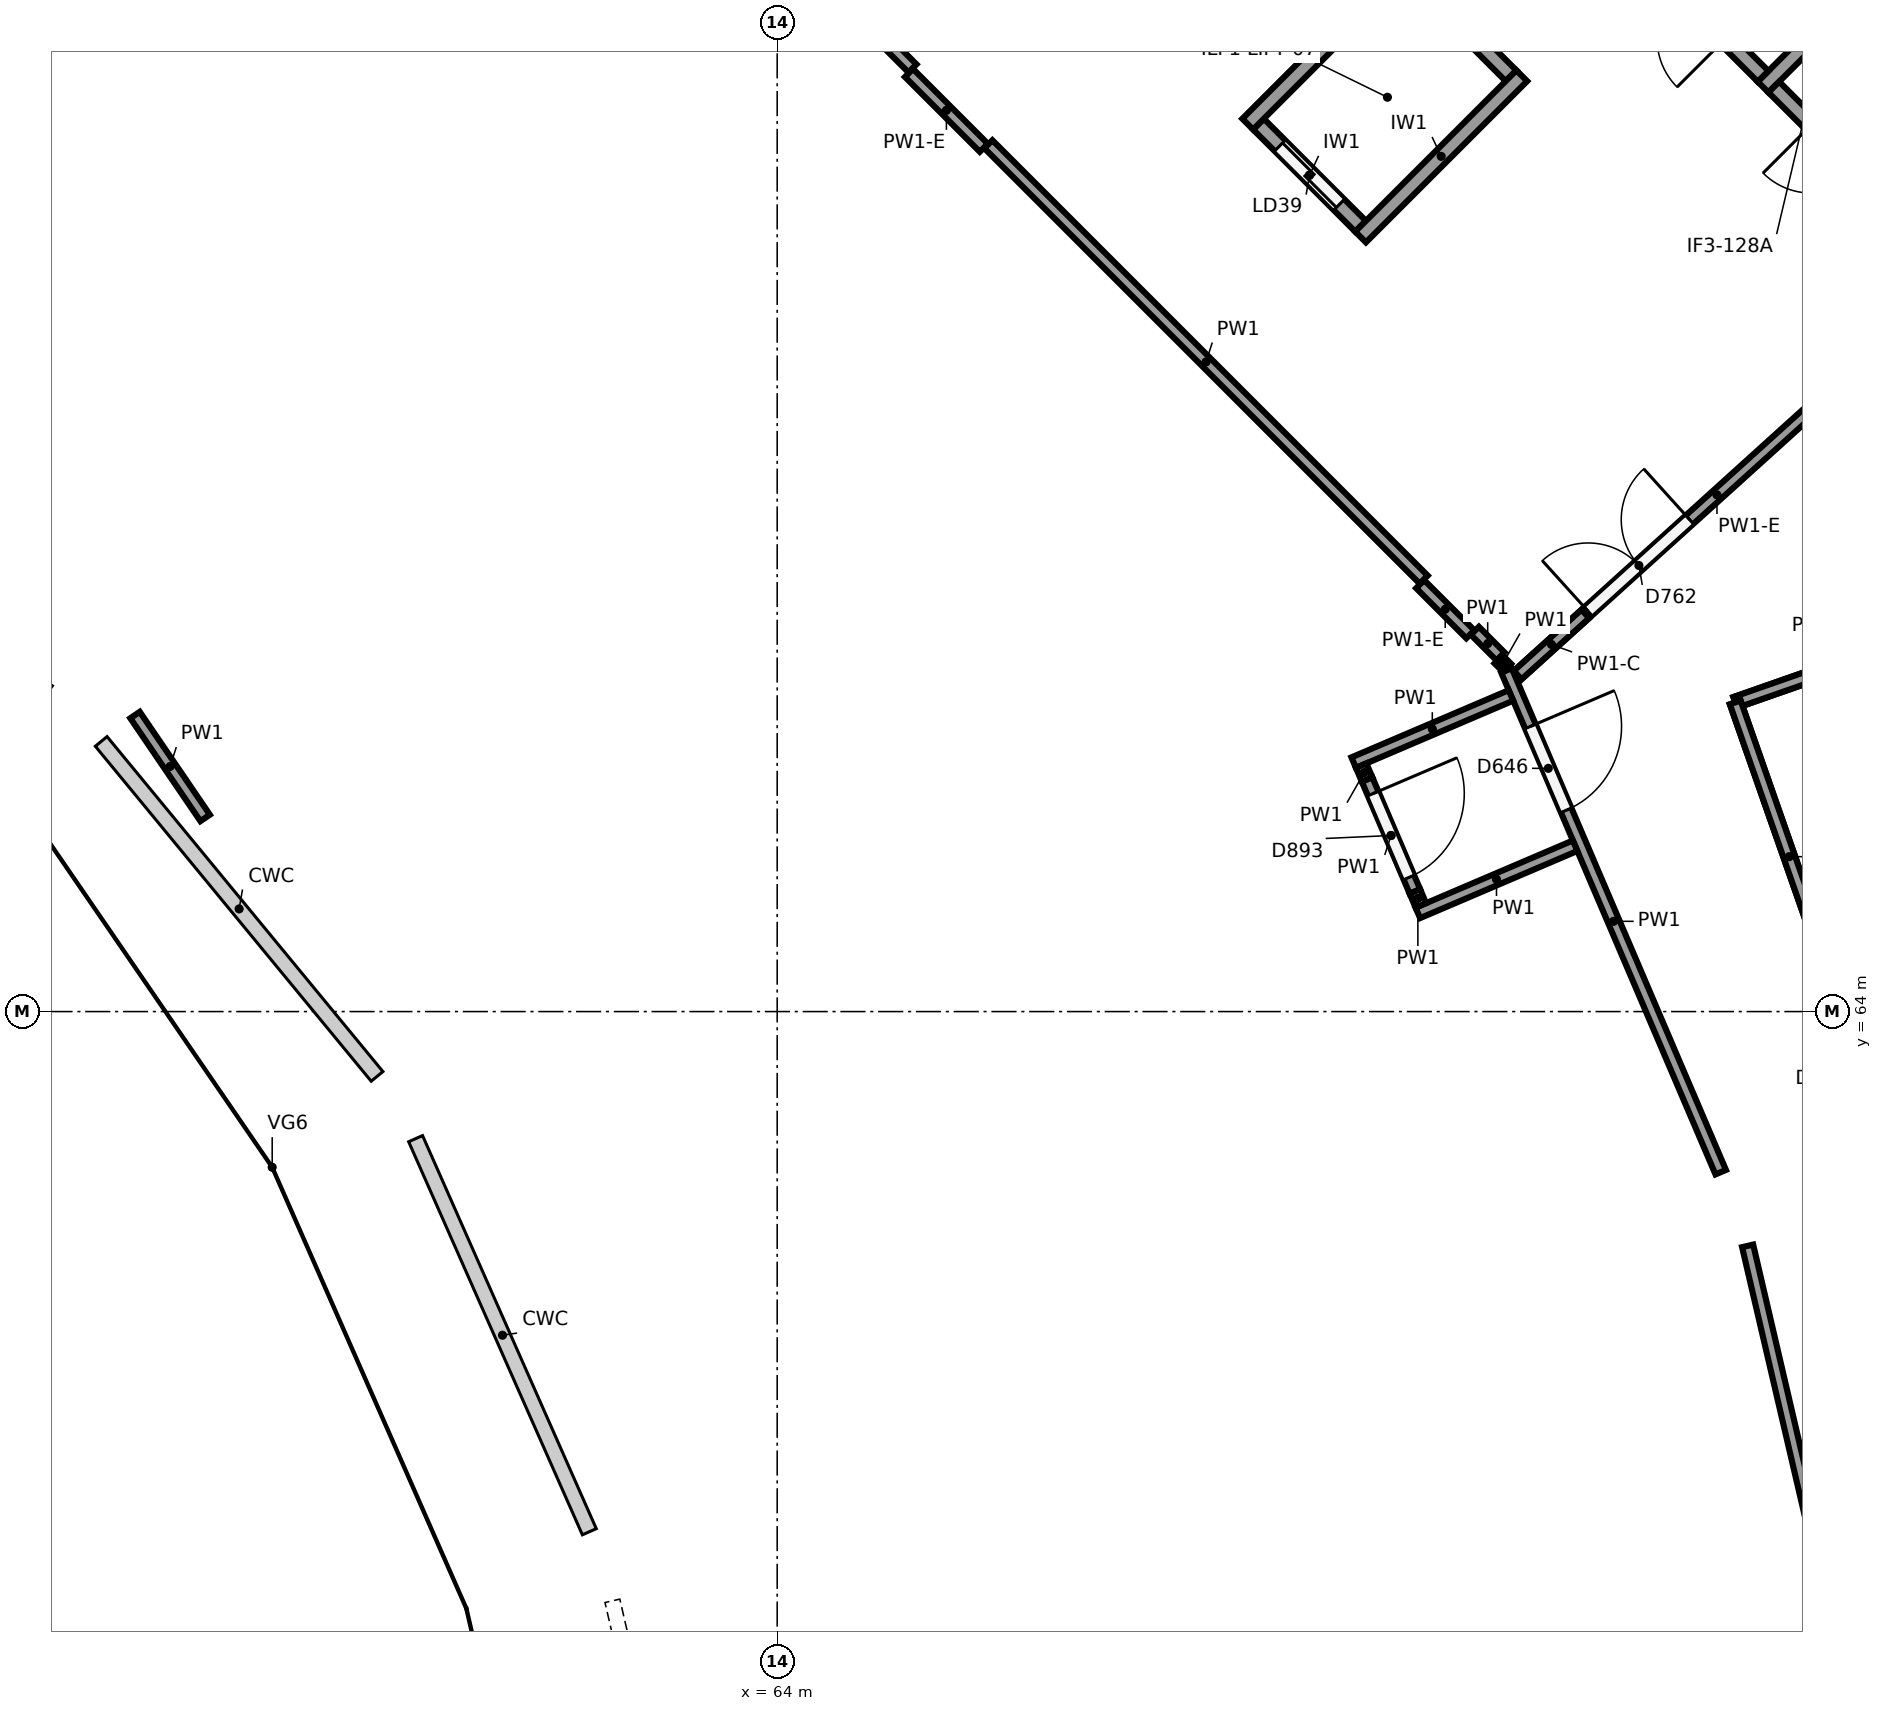
"""IFC4 building model, lengths in metres.
Left out: names, types, materials, properties, quantities, classifications, styles, units other than length and angle.
Written with IfcOpenShell. Run it as: python <this file> out.ifc"""

import sys

from ifc_helpers import new_model, si_unit, direction, frame, frame_2d, origin, origin_2d, place, context, subcontext, project, spatial, rectangle, circle, extrude, element, fill, save


model = new_model("IFC4")
c1 = context("Model", 3, precision=1e-05, world=origin(), true_north=direction((0.0, 1.0)))
c2 = subcontext(c1, "Body", "Model", "MODEL_VIEW")
j1 = project(units=[si_unit("LENGTHUNIT", "METRE"), si_unit("PLANEANGLEUNIT", "RADIAN")], contexts=[c1])
p1 = place(None, origin())
s1 = spatial("IfcSite", under=j1, at=p1, CompositionType="ELEMENT")
p2 = place(p1, origin())
s2 = spatial("IfcBuilding", under=s1, at=p2, CompositionType="ELEMENT")
p3 = place(p2, frame((0.0, 0.0, 6.5)))
s3 = spatial("IfcBuildingStorey", under=s2, at=p3, CompositionType="ELEMENT", Elevation=6.5)
p4 = place(p3, frame((61.723, 56.716, 0.0), z_axis=(0.0, 0.0, 1.0), x_axis=(1.0, 0.0, 0.0)))
e1 = element("IfcColumn", 1, at=p4, inside=s3, PredefinedType="COLUMN", context=c2, shape_type="SweptSolid", body=[
    extrude(circle(Radius=0.45, at=origin_2d()), origin(), (0.0, 0.0, 1.0), 5.5),
])
p5 = place(p3, frame((62.964, 57.104, 0.0), z_axis=(0.0, 0.0, 1.0), x_axis=(1.0, 0.0, 0.0)))
e2 = element("IfcColumn", 2, at=p5, inside=s3, PredefinedType="COLUMN", context=c2, shape_type="SweptSolid", body=[
    extrude(circle(Radius=0.4, at=origin_2d()), origin(), (0.0, 0.0, 1.0), 5.5),
])
p6 = place(p3, frame((71.17, 59.677, 0.0), z_axis=(0.0, 0.0, 1.0), x_axis=(1.0, 0.0, 0.0)))
e3 = element("IfcColumn", 3, at=p6, inside=s3, PredefinedType="COLUMN", context=c2, shape_type="SweptSolid", body=[
    extrude(circle(Radius=0.45, at=origin_2d()), origin(), (0.0, 0.0, 1.0), 5.5),
])
p7 = place(p3, frame((54.364, 60.513, 0.0), z_axis=(0.0, 0.0, 1.0), x_axis=(1.0, 0.0, 0.0)))
e4 = element("IfcColumn", 4, at=p7, inside=s3, PredefinedType="COLUMN", context=c2, shape_type="SweptSolid", body=[
    extrude(circle(Radius=0.45, at=origin_2d()), origin(), (0.0, 0.0, 1.0), 5.392),
])
p8 = place(p3, frame((59.049, 62.766, 0.0), z_axis=(0.0, 0.0, 1.0), x_axis=(1.0, 0.0, 0.0)))
e5 = element("IfcColumn", 5, at=p8, inside=s3, PredefinedType="COLUMN", context=c2, shape_type="SweptSolid", body=[
    extrude(circle(Radius=0.45, at=origin_2d()), origin(), (0.0, 0.0, 1.0), 5.5),
])
p9 = place(p3, frame((60.222, 63.331, 0.0), z_axis=(0.0, 0.0, 1.0), x_axis=(1.0, 0.0, 0.0)))
e6 = element("IfcColumn", 6, at=p9, inside=s3, PredefinedType="COLUMN", context=c2, shape_type="SweptSolid", body=[
    extrude(circle(Radius=0.4, at=origin_2d()), origin(), (0.0, 0.0, 1.0), 5.5),
])
for number, where, z_axis, x_axis in (
    (7, (67.972, 67.058, 0.0), (0.0, 0.0, 1.0), (1.0, 0.0, 0.0)),
    (8, (54.82, 67.902, 0.0), (0.0, 0.0, 1.0), (1.0, 0.0, 0.0)),
):
    element("IfcColumn", number, at=place(p3, frame(where, z_axis=z_axis, x_axis=x_axis)), inside=s3, PredefinedType="COLUMN", context=c2, shape_type="SweptSolid", body=[
        extrude(circle(Radius=0.45, at=origin_2d()), origin(), (0.0, 0.0, 1.0), 5.5),
    ])
p10 = place(p3, frame((55.94, 68.658, 0.0), z_axis=(0.0, 0.0, 1.0), x_axis=(1.0, 0.0, 0.0)))
e9 = element("IfcColumn", 9, at=p10, inside=s3, PredefinedType="COLUMN", context=c2, shape_type="SweptSolid", body=[
    extrude(circle(Radius=0.4, at=origin_2d()), origin(), (0.0, 0.0, 1.0), 5.5),
])
p11 = place(p3, frame((63.068, 73.47, 0.0), z_axis=(0.0, 0.0, 1.0), x_axis=(1.0, 0.0, 0.0)))
e10 = element("IfcColumn", 10, at=p11, inside=s3, PredefinedType="COLUMN", context=c2, shape_type="SweptSolid", body=[
    extrude(circle(Radius=0.45, at=origin_2d()), origin(), (0.0, 0.0, 1.0), 5.5),
])
p12 = place(p3, frame((78.173, 77.365, 0.0), z_axis=(0.0, 0.0, 1.0), x_axis=(-0.707178586901, -0.707034968179, 0.0)))
e11 = element("IfcWall", 11, at=p12, inside=s3, PredefinedType="SHEAR", context=c2, shape_type="SweptSolid", body=[
    extrude(rectangle(XDim=1.7, YDim=0.2, at=frame_2d((0.85, 0.0))), origin(), (0.0, 0.0, 1.0), 5.15),
])
p13 = place(p3, frame((79.375, 73.9, 0.0), z_axis=(0.0, 0.0, 1.0), x_axis=(-0.707068634461, 0.707144925854, 0.0)))
e12 = element("IfcWall", 12, at=p13, inside=s3, PredefinedType="SHEAR", context=c2, shape_type="SweptSolid", body=[
    extrude(rectangle(XDim=3.2, YDim=0.2, at=frame_2d((1.6, 0.0))), origin(), (0.0, 0.0, 1.0), 5.15),
])
p14 = place(p13, frame((0.7, 0.0, 0.0)))
e13 = element("IfcOpeningElement", 13, at=p14, cuts=e12, PredefinedType="OPENING", context=c2, shape_type="SweptSolid", body=[
    extrude(rectangle(XDim=1.8, YDim=2.1, at=frame_2d((0.9, 1.05))), frame((0.0, 0.11, 0.0), z_axis=(0.0, -1.0, 0.0), x_axis=(1.0, 0.0, 0.0)), (0.0, 0.0, 1.0), 0.22),
])
p15 = place(p3, frame((76.971, 76.304, 0.0), z_axis=(0.0, 0.0, 1.0), x_axis=(-0.707106781187, 0.707106781187, 0.0)))
e14 = element("IfcWall", 14, at=p15, inside=s3, PredefinedType="SHEAR", context=c2, shape_type="SweptSolid", body=[
    extrude(rectangle(XDim=3.2, YDim=0.2, at=frame_2d((1.6, 0.0))), origin(), (0.0, 0.0, 1.0), 5.15),
])
p16 = place(p15, frame((0.7, 0.0, 0.0)))
e15 = element("IfcOpeningElement", 15, at=p16, cuts=e14, PredefinedType="OPENING", context=c2, shape_type="SweptSolid", body=[
    extrude(rectangle(XDim=1.8, YDim=2.1, at=frame_2d((0.9, 1.05))), frame((0.0, 0.11, 0.0), z_axis=(0.0, -1.0, 0.0), x_axis=(1.0, 0.0, 0.0)), (0.0, 0.0, 1.0), 0.22),
])
for number, where, z_axis, x_axis in (
    (16, (73.797, 76.312, 0.0), (0.0, 0.0, 1.0), (-0.707, -0.707, 0.0)),
    (17, (72.312, 77.797, 0.0), (0.0, 0.0, 1.0), (-0.707, -0.707, 0.0)),
):
    element("IfcWall", number, at=place(p3, frame(where, z_axis=z_axis, x_axis=x_axis)), inside=s3, PredefinedType="SHEAR", context=c2, shape_type="SweptSolid", body=[
        extrude(rectangle(XDim=3.0, YDim=0.2, at=frame_2d((1.5, 0.0))), origin(), (0.0, 0.0, 1.0), 5.15),
    ])
p17 = place(p3, frame((73.656, 76.312, 0.0), z_axis=(0.0, 0.0, 1.0), x_axis=(-0.707106781187, 0.707106781187, 0.0)))
e18 = element("IfcWall", 18, at=p17, inside=s3, PredefinedType="SHEAR", context=c2, shape_type="SweptSolid", body=[
    extrude(rectangle(XDim=1.9, YDim=0.2, at=frame_2d((0.95, 0.0))), origin(), (0.0, 0.0, 1.0), 5.15),
])
p18 = place(p3, frame((71.676, 74.332, 0.0), z_axis=(0.0, 0.0, 1.0), x_axis=(-0.707106781187, 0.707106781187, 0.0)))
e19 = element("IfcWall", 19, at=p18, inside=s3, PredefinedType="SHEAR", context=c2, shape_type="SweptSolid", body=[
    extrude(rectangle(XDim=1.9, YDim=0.2, at=frame_2d((0.95, 0.0))), origin(), (0.0, 0.0, 1.0), 5.15),
])
p19 = place(p18, frame((0.4, 0.0, 0.0)))
e20 = element("IfcOpeningElement", 20, at=p19, cuts=e19, PredefinedType="OPENING", context=c2, shape_type="SweptSolid", body=[
    extrude(rectangle(XDim=1.1, YDim=2.1, at=frame_2d((0.55, 1.05))), frame((0.0, 0.11, 0.0), z_axis=(0.0, -1.0, 0.0), x_axis=(1.0, 0.0, 0.0)), (0.0, 0.0, 1.0), 0.22),
])
p20 = place(p3, frame((76.768, 60.918, 0.0), z_axis=(0.0, 0.0, 1.0), x_axis=(0.226944673482, -0.973907652284, 0.0)))
e21 = element("IfcWall", 21, at=p20, inside=s3, PredefinedType="PARTITIONING", context=c2, shape_type="SweptSolid", body=[
    extrude(rectangle(XDim=7.882, YDim=0.15, at=frame_2d((3.941, 0.0))), origin(), (0.0, 0.0, 1.0), 5.15),
])
p21 = place(p3, frame((56.473, 66.547, 0.0), z_axis=(0.0, 0.0, 1.0), x_axis=(-0.562994599626, 0.826460574252, 0.0)))
e22 = element("IfcWall", 22, at=p21, inside=s3, PredefinedType="PARTITIONING", context=c2, shape_type="SweptSolid", body=[
    extrude(rectangle(XDim=1.638, YDim=0.15, at=frame_2d((0.819, 0.0))), origin(), (0.0, 0.0, 1.0), 5.15),
])
p22 = place(p3, frame((66.779, 75.41, 0.0), z_axis=(0.0, 0.0, 1.0), x_axis=(0.707091708943, -0.707121853109, 0.0)))
e23 = element("IfcWall", 23, at=p22, inside=s3, PredefinedType="PARTITIONING", context=c2, shape_type="SweptSolid", body=[
    extrude(rectangle(XDim=8.099, YDim=0.15, at=frame_2d((4.05, 0.0))), origin(), (0.0, 0.0, 1.0), 5.15),
])
p23 = place(p3, frame((73.179, 69.01, 0.0), z_axis=(0.0, 0.0, 1.0), x_axis=(0.707106781187, -0.707106781187, 0.0)))
e24 = element("IfcWall", 24, at=p23, inside=s3, PredefinedType="PARTITIONING", context=c2, shape_type="SweptSolid", body=[
    extrude(rectangle(XDim=0.477, YDim=0.15, at=frame_2d((0.238, 0.0))), origin(), (0.0, 0.0, 1.0), 5.15),
])
p24 = place(p3, frame((73.595, 68.488, 0.0), z_axis=(0.0, 0.0, 1.0), x_axis=(0.392716080943, -0.919659763047, 0.0)))
e25 = element("IfcWall", 25, at=p24, inside=s3, PredefinedType="PARTITIONING", context=c2, shape_type="SweptSolid", body=[
    extrude(rectangle(XDim=7.177, YDim=0.15, at=frame_2d((3.589, 0.0))), origin(), (0.0, 0.0, 1.0), 5.15),
])
p25 = place(p24, frame((0.8, 0.0, 0.0)))
e26 = element("IfcOpeningElement", 26, at=p25, cuts=e25, PredefinedType="OPENING", context=c2, shape_type="SweptSolid", body=[
    extrude(rectangle(XDim=1.2, YDim=2.1, at=frame_2d((0.6, 1.05))), frame((0.0, 0.085, 0.0), z_axis=(0.0, -1.0, 0.0), x_axis=(1.0, 0.0, 0.0)), (0.0, 0.0, 1.0), 0.17),
])
p26 = place(p3, frame((64.216, 77.973, 0.0), z_axis=(0.0, 0.0, 1.0), x_axis=(0.707161957089, -0.707051600978, 0.0)))
e27 = element("IfcWall", 27, at=p26, inside=s3, PredefinedType="PARTITIONING", context=c2, shape_type="SweptSolid", body=[
    extrude(rectangle(XDim=2.212, YDim=0.15, at=frame_2d((1.106, 0.0))), origin(), (0.0, 0.0, 1.0), 5.15),
])
p27 = place(p3, frame((82.677, 70.192, 0.0), z_axis=(0.0, 0.0, 1.0), x_axis=(-0.943884385731, -0.330276045715, 0.0)))
e28 = element("IfcWall", 28, at=p27, inside=s3, PredefinedType="PARTITIONING", context=c2, shape_type="SweptSolid", body=[
    extrude(rectangle(XDim=6.433, YDim=0.15, at=frame_2d((3.217, 0.0))), origin(), (0.0, 0.0, 1.0), 4.25),
])
p28 = place(p27, frame((0.75, 0.0, 0.0)))
e29 = element("IfcOpeningElement", 29, at=p28, cuts=e28, PredefinedType="OPENING", context=c2, shape_type="SweptSolid", body=[
    extrude(rectangle(XDim=1.8, YDim=2.1, at=frame_2d((0.9, 1.05))), frame((0.0, 0.085, 0.0), z_axis=(0.0, -1.0, 0.0), x_axis=(1.0, 0.0, 0.0)), (0.0, 0.0, 1.0), 0.17),
])
p29 = place(p3, frame((78.941, 68.884, 4.25), z_axis=(0.0, 0.0, 1.0), x_axis=(-0.943892194222, -0.330253729256, 0.0)))
e30 = element("IfcWall", 30, at=p29, inside=s3, PredefinedType="PARTITIONING", context=c2, shape_type="SweptSolid", body=[
    extrude(rectangle(XDim=2.474, YDim=0.15, at=frame_2d((1.237, 0.0))), origin(), (0.0, 0.0, 1.0), 0.9),
])
p30 = place(p3, frame((76.605, 68.067, 0.0), z_axis=(0.0, 0.0, 1.0), x_axis=(0.330282309563, -0.943882193915, 0.0)))
e31 = element("IfcWall", 31, at=p30, inside=s3, PredefinedType="PARTITIONING", context=c2, shape_type="SweptSolid", body=[
    extrude(rectangle(XDim=13.89, YDim=0.15, at=frame_2d((6.945, 0.0))), origin(), (0.0, 0.0, 1.0), 4.05),
])
p31 = place(p30, frame((4.35, 0.0, 0.0)))
e32 = element("IfcOpeningElement", 32, at=p31, cuts=e31, PredefinedType="OPENING", context=c2, shape_type="SweptSolid", body=[
    extrude(rectangle(XDim=1.8, YDim=2.1, at=frame_2d((0.9, 1.05))), frame((0.0, 0.085, 0.0), z_axis=(0.0, -1.0, 0.0), x_axis=(1.0, 0.0, 0.0)), (0.0, 0.0, 1.0), 0.17),
])
p32 = place(p3, frame((76.605, 68.067, 4.05), z_axis=(0.0, 0.0, 1.0), x_axis=(0.330261909448, -0.943889332055, 0.0)))
e33 = element("IfcWall", 33, at=p32, inside=s3, PredefinedType="PARTITIONING", context=c2, shape_type="SweptSolid", body=[
    extrude(rectangle(XDim=4.3, YDim=0.15, at=frame_2d((2.15, 0.0))), origin(), (0.0, 0.0, 1.0), 1.1),
])
p33 = place(p3, frame((65.734, 76.349, 0.0), z_axis=(0.0, 0.0, 1.0), x_axis=(0.707106781187, -0.707106781187, 0.0)))
e34 = element("IfcWall", 34, at=p33, inside=s3, PredefinedType="PARTITIONING", context=c2, shape_type="SweptSolid", body=[
    extrude(rectangle(XDim=1.393, YDim=0.15, at=frame_2d((0.696, 0.0))), origin(), (0.0, 0.0, 1.0), 4.05),
])
p34 = place(p3, frame((72.46, 69.623, 0.0), z_axis=(0.0, 0.0, 1.0), x_axis=(0.707106781187, -0.707106781187, 0.0)))
e35 = element("IfcWall", 35, at=p34, inside=s3, PredefinedType="PARTITIONING", context=c2, shape_type="SweptSolid", body=[
    extrude(rectangle(XDim=0.933, YDim=0.15, at=frame_2d((0.466, 0.0))), origin(), (0.0, 0.0, 1.0), 4.05),
])
p35 = place(p3, frame((73.492, 68.634, 0.0), z_axis=(0.0, 0.0, 1.0), x_axis=(0.706331870343, -0.707880843743, 0.0)))
e36 = element("IfcWall", 36, at=p35, inside=s3, PredefinedType="PARTITIONING", context=c2, shape_type="SweptSolid", body=[
    extrude(rectangle(XDim=0.158, YDim=0.15, at=frame_2d((0.079, 0.0))), origin(), (0.0, 0.0, 1.0), 5.15),
])
p36 = place(p3, frame((73.742, 68.427, 0.0), z_axis=(0.0, 0.0, 1.0), x_axis=(0.741827757785, 0.670590469496, 0.0)))
e37 = element("IfcWall", 37, at=p36, inside=s3, PredefinedType="PARTITIONING", context=c2, shape_type="SweptSolid", body=[
    extrude(rectangle(XDim=7.07, YDim=0.15, at=frame_2d((3.535, 0.0))), origin(), (0.0, 0.0, 1.0), 4.05),
])
p37 = place(p36, frame((1.25, 0.0, 0.0)))
e38 = element("IfcOpeningElement", 38, at=p37, cuts=e37, PredefinedType="OPENING", context=c2, shape_type="SweptSolid", body=[
    extrude(rectangle(XDim=1.8, YDim=2.1, at=frame_2d((0.9, 1.05))), frame((0.0, 0.085, 0.0), z_axis=(0.0, -1.0, 0.0), x_axis=(1.0, 0.0, 0.0)), (0.0, 0.0, 1.0), 0.17),
])
p38 = place(p3, frame((73.742, 68.427, 4.05), z_axis=(0.0, 0.0, 1.0), x_axis=(0.741906759341, 0.670503065201, 0.0)))
e39 = element("IfcWall", 39, at=p38, inside=s3, PredefinedType="PARTITIONING", context=c2, shape_type="SweptSolid", body=[
    extrude(rectangle(XDim=1.2, YDim=0.15, at=frame_2d((0.6, 0.0))), origin(), (0.0, 0.0, 1.0), 1.1),
])
p39 = place(p3, frame((73.654, 68.159, 0.0), z_axis=(0.0, 0.0, 1.0), x_axis=(-0.919638165537, -0.392766653993, 0.0)))
e40 = element("IfcWall", 40, at=p39, inside=s3, PredefinedType="PARTITIONING", context=c2, shape_type="SweptSolid", body=[
    extrude(rectangle(XDim=2.25, YDim=0.15, at=frame_2d((1.125, 0.0))), origin(), (0.0, 0.0, 1.0), 5.15),
])
p40 = place(p3, frame((74.498, 66.182, 0.0), z_axis=(0.0, 0.0, 1.0), x_axis=(-0.919660619765, -0.392714074682, 0.0)))
e41 = element("IfcWall", 41, at=p40, inside=s3, PredefinedType="PARTITIONING", context=c2, shape_type="SweptSolid", body=[
    extrude(rectangle(XDim=2.25, YDim=0.15, at=frame_2d((1.125, 0.0))), origin(), (0.0, 0.0, 1.0), 5.15),
])
p41 = place(p3, frame((71.683, 67.236, 0.0), z_axis=(0.0, 0.0, 1.0), x_axis=(0.391709037985, -0.920089142182, 0.0)))
e42 = element("IfcWall", 42, at=p41, inside=s3, PredefinedType="PARTITIONING", context=c2, shape_type="SweptSolid", body=[
    extrude(rectangle(XDim=0.2, YDim=0.15, at=frame_2d((0.1, 0.0))), origin(), (0.0, 0.0, 1.0), 5.15),
])
p42 = place(p3, frame((71.762, 67.052, 0.0), z_axis=(0.0, 0.0, 1.0), x_axis=(0.392758797822, -0.919641520775, 0.0)))
e43 = element("IfcWall", 43, at=p42, inside=s3, PredefinedType="PARTITIONING", context=c2, shape_type="SweptSolid", body=[
    extrude(rectangle(XDim=1.6, YDim=0.15, at=frame_2d((0.8, 0.0))), origin(), (0.0, 0.0, 1.0), 5.15),
])
p43 = place(p42, frame((0.2, 0.0, 0.0)))
e44 = element("IfcOpeningElement", 44, at=p43, cuts=e43, PredefinedType="OPENING", context=c2, shape_type="SweptSolid", body=[
    extrude(rectangle(XDim=1.2, YDim=2.1, at=frame_2d((0.6, 1.05))), frame((0.0, 0.085, 0.0), z_axis=(0.0, -1.0, 0.0), x_axis=(1.0, 0.0, 0.0)), (0.0, 0.0, 1.0), 0.17),
])
p44 = place(p3, frame((72.39, 65.581, 0.0), z_axis=(0.0, 0.0, 1.0), x_axis=(0.393182323567, -0.91946052685, 0.0)))
e45 = element("IfcWall", 45, at=p44, inside=s3, PredefinedType="PARTITIONING", context=c2, shape_type="SweptSolid", body=[
    extrude(rectangle(XDim=0.2, YDim=0.15, at=frame_2d((0.1, 0.0))), origin(), (0.0, 0.0, 1.0), 5.15),
])
p45 = place(p19, origin())
e46 = element("IfcDoor", 46, at=p45, inside=s3, OperationType="SLIDING_TO_LEFT", PredefinedType="DOOR", context=c2, shape_type="SweptSolid", body=[
    extrude(rectangle(XDim=1.1, YDim=2.1, at=frame_2d((0.55, 1.05))), frame((0.0, 0.025, 0.0), z_axis=(0.0, -1.0, 0.0), x_axis=(1.0, 0.0, 0.0)), (0.0, 0.0, 1.0), 0.05),
])
fill(e20, e46)
p46 = place(p25, origin())
e47 = element("IfcDoor", 47, at=p46, inside=s3, OperationType="SINGLE_SWING_LEFT", PredefinedType="DOOR", context=c2, shape_type="SweptSolid", body=[
    extrude(rectangle(XDim=1.2, YDim=2.1, at=frame_2d((0.6, 1.05))), frame((0.0, 0.025, 0.0), z_axis=(0.0, -1.0, 0.0), x_axis=(1.0, 0.0, 0.0)), (0.0, 0.0, 1.0), 0.05),
])
fill(e26, e47)
p47 = place(p37, origin())
e48 = element("IfcDoor", 48, at=p47, inside=s3, OperationType="DOUBLE_DOOR_SINGLE_SWING", PredefinedType="DOOR", context=c2, shape_type="SweptSolid", body=[
    extrude(rectangle(XDim=1.8, YDim=2.1, at=frame_2d((0.9, 1.05))), frame((0.0, 0.025, 0.0), z_axis=(0.0, -1.0, 0.0), x_axis=(1.0, 0.0, 0.0)), (0.0, 0.0, 1.0), 0.05),
])
fill(e38, e48)
p48 = place(p43, origin())
e49 = element("IfcDoor", 49, at=p48, inside=s3, OperationType="SINGLE_SWING_LEFT", PredefinedType="DOOR", context=c2, shape_type="SweptSolid", body=[
    extrude(rectangle(XDim=1.2, YDim=2.1, at=frame_2d((0.6, 1.05))), frame((0.0, 0.025, 0.0), z_axis=(0.0, -1.0, 0.0), x_axis=(1.0, 0.0, 0.0)), (0.0, 0.0, 1.0), 0.05),
])
fill(e44, e49)
save(model, sys.argv[1])
